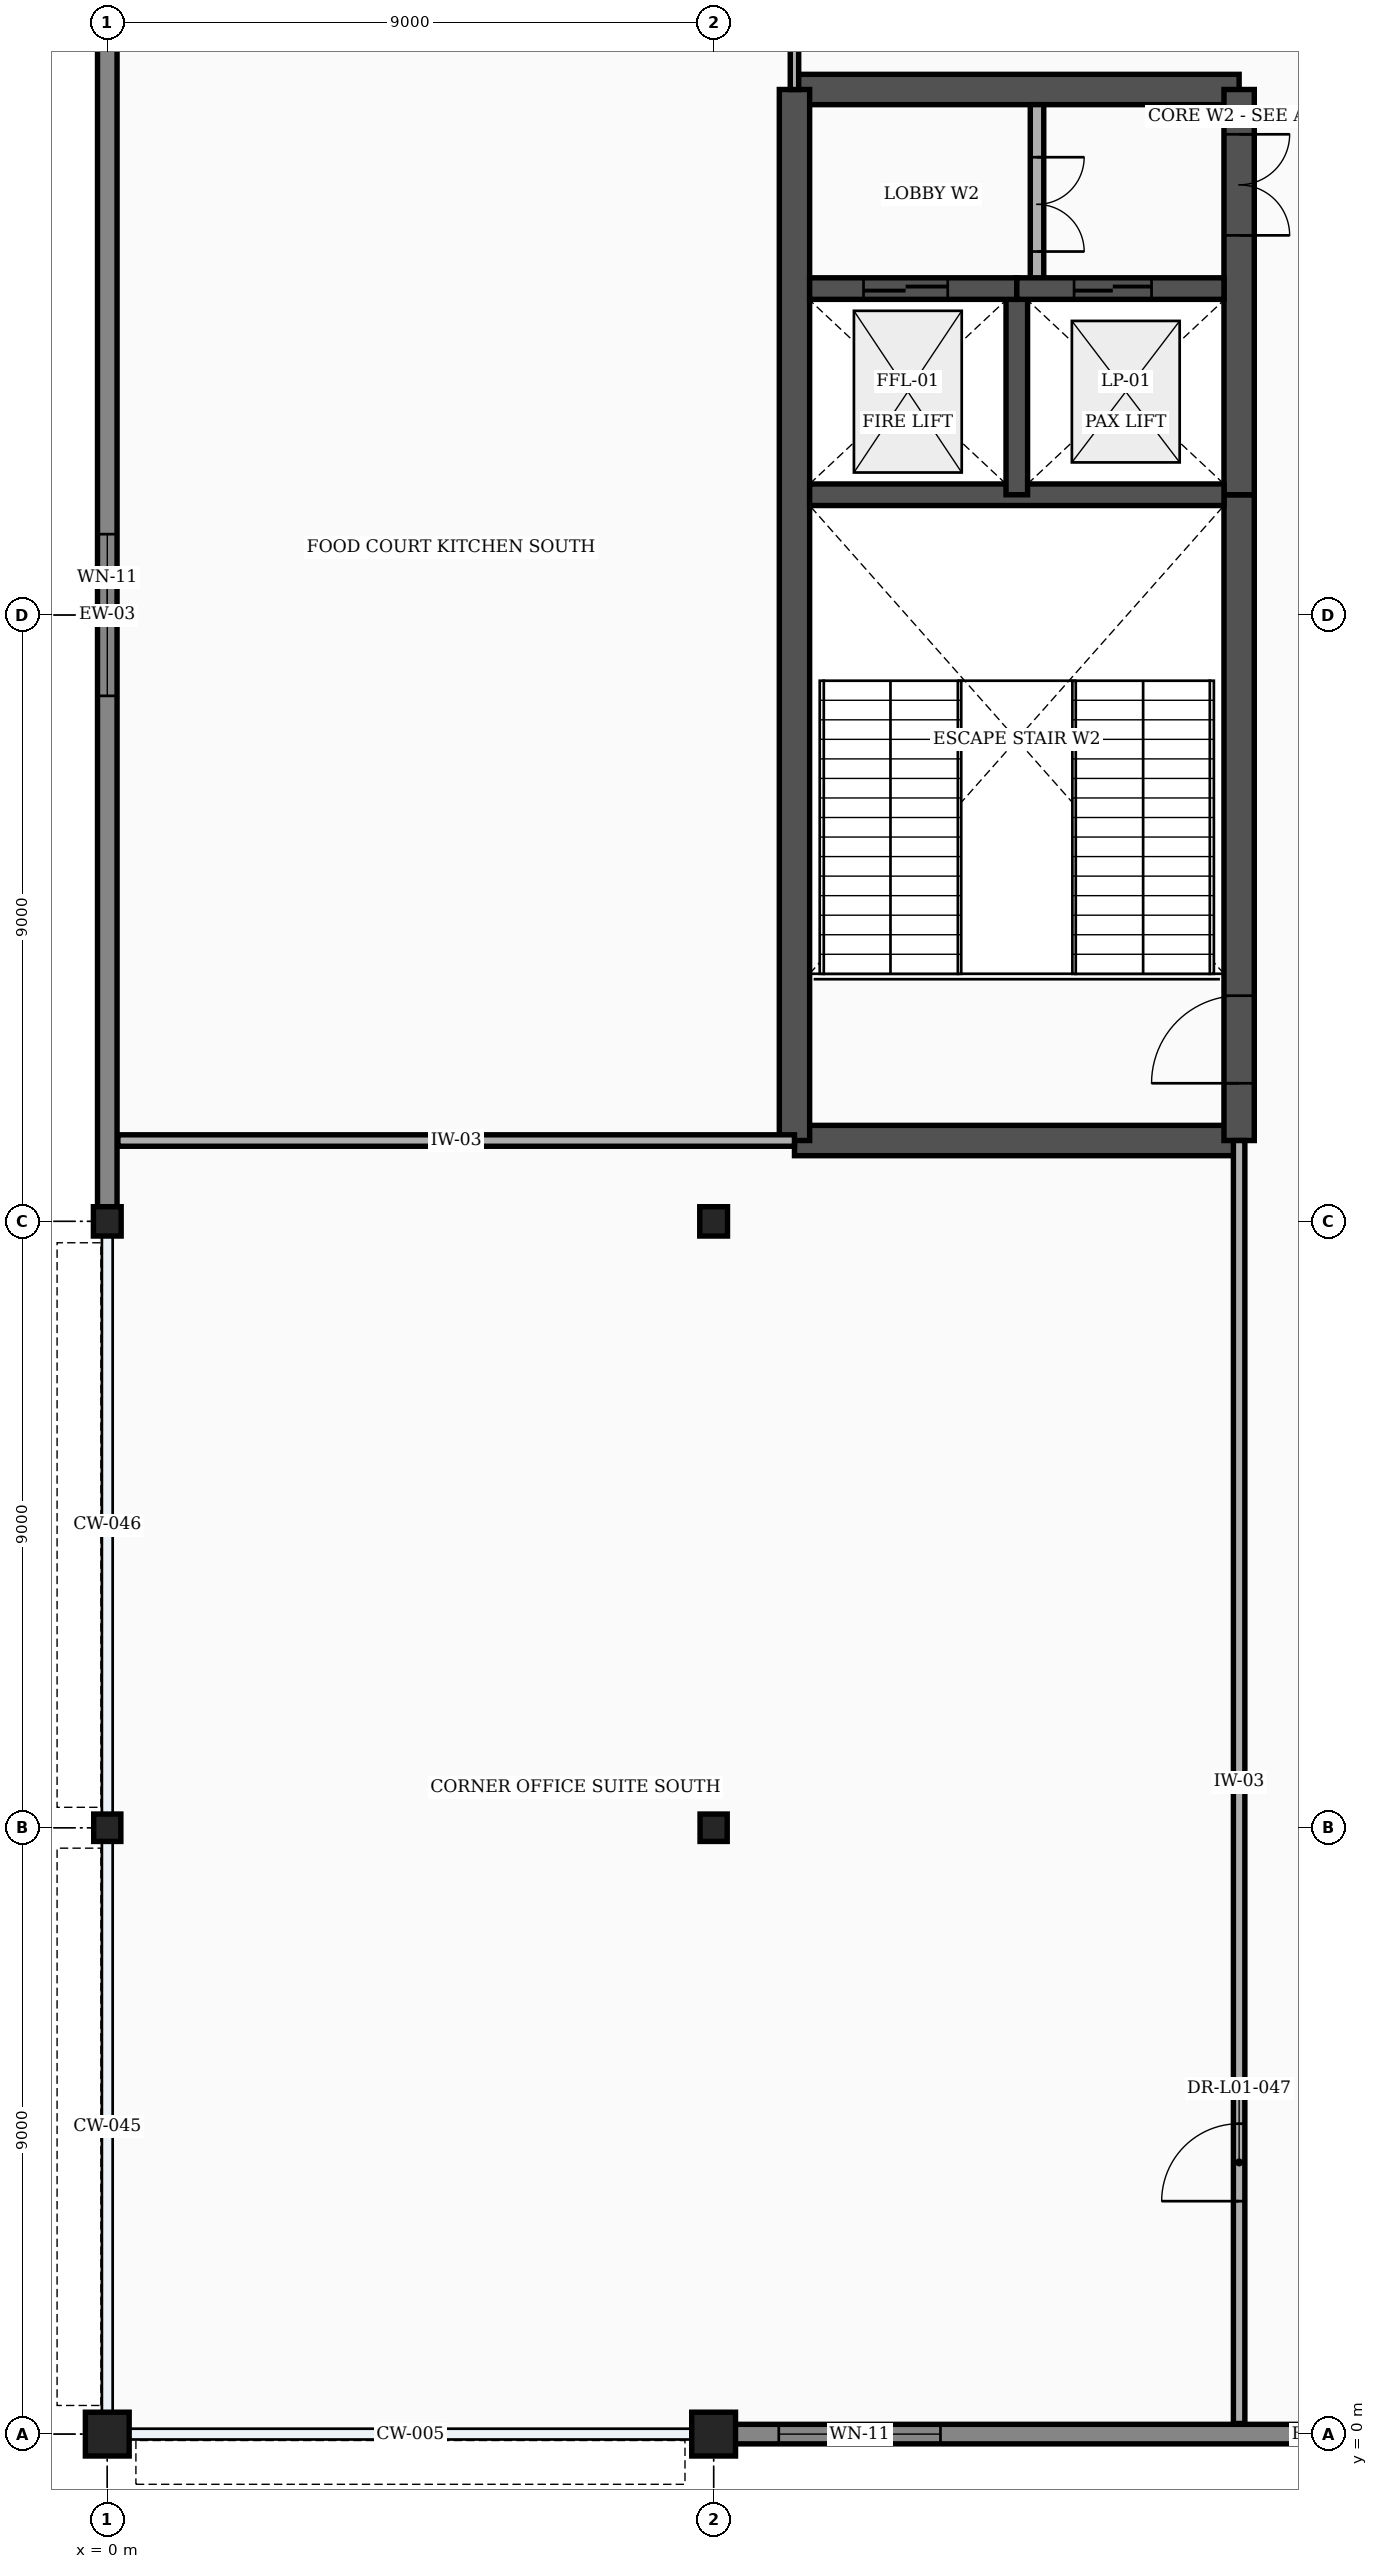
"""IFC4 building model, lengths in metres.
Left out: names, types, materials, properties, quantities, classifications, styles, units other than length and angle.
Written with IfcOpenShell. Run it as: python <this file> out.ifc"""

import sys

from ifc_helpers import new_model, si_unit, direction, frame, frame_2d, origin, origin_with_axes, origin_2d, place, context, subcontext, project, spatial, rectangle, i_section, extrude, element, fill, save


model = new_model("IFC4")
c1 = context("Model", 3, precision=1e-05, world=origin(), true_north=direction((0.0, 1.0)))
c2 = subcontext(c1, "Body", "Model", "MODEL_VIEW")
j1 = project(units=[si_unit("LENGTHUNIT", "METRE"), si_unit("PLANEANGLEUNIT", "RADIAN")], contexts=[c1])
p1 = place(None, origin())
s1 = spatial("IfcSite", under=j1, at=p1, CompositionType="ELEMENT")
p2 = place(p1, origin())
s2 = spatial("IfcBuilding", under=s1, at=p2, CompositionType="ELEMENT")
p3 = place(p2, frame((0.0, 0.0, 6.0)))
s3 = spatial("IfcBuildingStorey", under=s2, at=p3, CompositionType="ELEMENT", Elevation=6.0)
p4 = place(p3, origin_with_axes())
e1 = element("IfcColumn", 1, at=p4, inside=s3, PredefinedType="COLUMN", context=c2, shape_type="SweptSolid", body=[
    extrude(rectangle(XDim=0.65, YDim=0.65, at=origin_2d()), origin(), (0.0, 0.0, 1.0), 5.4),
])
p5 = place(p3, frame((0.0, 9.0, 0.0), z_axis=(0.0, 0.0, 1.0), x_axis=(1.0, 0.0, 0.0)))
e2 = element("IfcColumn", 2, at=p5, inside=s3, PredefinedType="COLUMN", context=c2, shape_type="SweptSolid", body=[
    extrude(i_section(OverallWidth=0.403, OverallDepth=0.406, WebThickness=0.027, FlangeThickness=0.043, at=origin_2d()), origin(), (0.0, 0.0, 1.0), 5.4),
])
p6 = place(p3, frame((0.0, 18.0, 0.0), z_axis=(0.0, 0.0, 1.0), x_axis=(1.0, 0.0, 0.0)))
e3 = element("IfcColumn", 3, at=p6, inside=s3, PredefinedType="COLUMN", context=c2, shape_type="SweptSolid", body=[
    extrude(i_section(OverallWidth=0.412, OverallDepth=0.435, WebThickness=0.036, FlangeThickness=0.058, at=origin_2d()), origin(), (0.0, 0.0, 1.0), 5.4),
])
p7 = place(p3, frame((9.0, 0.0, 0.0), z_axis=(0.0, 0.0, 1.0), x_axis=(1.0, 0.0, 0.0)))
e4 = element("IfcColumn", 4, at=p7, inside=s3, PredefinedType="COLUMN", context=c2, shape_type="SweptSolid", body=[
    extrude(rectangle(XDim=0.65, YDim=0.65, at=origin_2d()), origin(), (0.0, 0.0, 1.0), 5.4),
])
p8 = place(p3, frame((9.0, 9.0, 0.0), z_axis=(0.0, 0.0, 1.0), x_axis=(1.0, 0.0, 0.0)))
e5 = element("IfcColumn", 5, at=p8, inside=s3, PredefinedType="COLUMN", context=c2, shape_type="SweptSolid", body=[
    extrude(i_section(OverallWidth=0.403, OverallDepth=0.406, WebThickness=0.027, FlangeThickness=0.043, at=origin_2d()), origin(), (0.0, 0.0, 1.0), 5.4),
])
p9 = place(p3, frame((9.0, 18.0, 0.0), z_axis=(0.0, 0.0, 1.0), x_axis=(1.0, 0.0, 0.0)))
e6 = element("IfcColumn", 6, at=p9, inside=s3, PredefinedType="COLUMN", context=c2, shape_type="SweptSolid", body=[
    extrude(i_section(OverallWidth=0.412, OverallDepth=0.435, WebThickness=0.036, FlangeThickness=0.058, at=origin_2d()), origin(), (0.0, 0.0, 1.0), 5.4),
])
p10 = place(p3, frame((9.317, 0.0, 0.0), z_axis=(0.0, 0.0, 1.0), x_axis=(1.0, 0.0, 0.0)))
e7 = element("IfcWall", 7, at=p10, inside=s3, PredefinedType="STANDARD", context=c2, shape_type="SweptSolid", body=[
    extrude(rectangle(XDim=17.366, YDim=0.29, at=frame_2d((8.683, 0.0))), origin(), (0.0, 0.0, 1.0), 4.388),
])
p11 = place(p10, frame((0.65, 0.0, 0.85)))
e8 = element("IfcOpeningElement", 8, at=p11, cuts=e7, PredefinedType="OPENING", context=c2, shape_type="SweptSolid", body=[
    extrude(rectangle(XDim=2.4, YDim=2.6, at=frame_2d((1.2, 1.3))), frame((0.0, 0.157, 0.0), z_axis=(0.0, -1.0, 0.0), x_axis=(1.0, 0.0, 0.0)), (0.0, 0.0, 1.0), 0.314),
])
p12 = place(p3, frame((0.0, 18.198, 0.0), z_axis=(0.0, 0.0, 1.0), x_axis=(0.0, 1.0, 0.0)))
e9 = element("IfcWall", 9, at=p12, inside=s3, PredefinedType="STANDARD", context=c2, shape_type="SweptSolid", body=[
    extrude(rectangle(XDim=17.603, YDim=0.29, at=frame_2d((8.802, 0.0))), origin(), (0.0, 0.0, 1.0), 4.467),
])
p13 = place(p12, frame((7.602, 0.0, 0.85)))
e10 = element("IfcOpeningElement", 10, at=p13, cuts=e9, PredefinedType="OPENING", context=c2, shape_type="SweptSolid", body=[
    extrude(rectangle(XDim=2.4, YDim=2.6, at=frame_2d((1.2, 1.3))), frame((0.0, 0.157, 0.0), z_axis=(0.0, -1.0, 0.0), x_axis=(1.0, 0.0, 0.0)), (0.0, 0.0, 1.0), 0.314),
])
for number, where, z_axis, x_axis in (
    (11, (10.2, 19.2, 0.0), (0.0, 0.0, 1.0), (1.0, 0.0, 0.0)),
    (12, (10.2, 34.8, 0.0), (0.0, 0.0, 1.0), (1.0, 0.0, 0.0)),
):
    element("IfcWall", number, at=place(p3, frame(where, z_axis=z_axis, x_axis=x_axis)), inside=s3, PredefinedType="SHEAR", context=c2, shape_type="SweptSolid", body=[
        extrude(rectangle(XDim=6.6, YDim=0.45, at=frame_2d((3.3, 0.0))), origin(), (0.0, 0.0, 1.0), 5.15),
    ])
p14 = place(p3, frame((10.2, 19.2, 0.0), z_axis=(0.0, 0.0, 1.0), x_axis=(0.0, 1.0, 0.0)))
e13 = element("IfcWall", 13, at=p14, inside=s3, PredefinedType="SHEAR", context=c2, shape_type="SweptSolid", body=[
    extrude(rectangle(XDim=15.6, YDim=0.45, at=frame_2d((7.8, 0.0))), origin(), (0.0, 0.0, 1.0), 5.15),
])
p15 = place(p3, frame((16.8, 19.2, 0.0), z_axis=(0.0, 0.0, 1.0), x_axis=(0.0, 1.0, 0.0)))
e14 = element("IfcWall", 14, at=p15, inside=s3, PredefinedType="SHEAR", context=c2, shape_type="SweptSolid", body=[
    extrude(rectangle(XDim=9.585, YDim=0.45, at=frame_2d((4.792, 0.0))), origin(), (0.0, 0.0, 1.0), 5.15),
])
p16 = place(p15, frame((0.85, 0.0, 0.0)))
e15 = element("IfcOpeningElement", 15, at=p16, cuts=e14, PredefinedType="OPENING", context=c2, shape_type="SweptSolid", body=[
    extrude(rectangle(XDim=1.3, YDim=2.2, at=frame_2d((0.65, 1.1))), frame((0.0, 0.237, 0.0), z_axis=(0.0, -1.0, 0.0), x_axis=(1.0, 0.0, 0.0)), (0.0, 0.0, 1.0), 0.474),
])
p17 = place(p3, frame((16.8, 28.785, 0.0), z_axis=(0.0, 0.0, 1.0), x_axis=(0.0, 1.0, 0.0)))
e16 = element("IfcWall", 16, at=p17, inside=s3, PredefinedType="SHEAR", context=c2, shape_type="SweptSolid", body=[
    extrude(rectangle(XDim=6.015, YDim=0.45, at=frame_2d((3.008, 0.0))), origin(), (0.0, 0.0, 1.0), 5.15),
])
p18 = place(p17, frame((3.85, 0.0, 0.0)))
e17 = element("IfcOpeningElement", 17, at=p18, cuts=e16, PredefinedType="OPENING", context=c2, shape_type="SweptSolid", body=[
    extrude(rectangle(XDim=1.5, YDim=2.2, at=frame_2d((0.75, 1.1))), frame((0.0, 0.237, 0.0), z_axis=(0.0, -1.0, 0.0), x_axis=(1.0, 0.0, 0.0)), (0.0, 0.0, 1.0), 0.474),
])
p19 = place(p3, frame((10.425, 28.785, 0.0), z_axis=(0.0, 0.0, 1.0), x_axis=(1.0, 0.0, 0.0)))
e18 = element("IfcWall", 18, at=p19, inside=s3, PredefinedType="SHEAR", context=c2, shape_type="SweptSolid", body=[
    extrude(rectangle(XDim=6.15, YDim=0.32, at=frame_2d((3.075, 0.0))), origin(), (0.0, 0.0, 1.0), 5.15),
])
p20 = place(p3, frame((13.5, 28.785, 0.0), z_axis=(0.0, 0.0, 1.0), x_axis=(0.0, 1.0, 0.0)))
e19 = element("IfcWall", 19, at=p20, inside=s3, PredefinedType="SHEAR", context=c2, shape_type="SweptSolid", body=[
    extrude(rectangle(XDim=3.06, YDim=0.32, at=frame_2d((1.53, 0.0))), origin(), (0.0, 0.0, 1.0), 5.15),
])
p21 = place(p3, frame((13.8, 31.845, 0.0), z_axis=(0.0, 0.0, 1.0), x_axis=(0.0, 1.0, 0.0)))
e20 = element("IfcWall", 20, at=p21, inside=s3, PredefinedType="PARTITIONING", context=c2, shape_type="SweptSolid", body=[
    extrude(rectangle(XDim=2.73, YDim=0.2, at=frame_2d((1.365, 0.0))), origin(), (0.0, 0.0, 1.0), 5.15),
])
p22 = place(p21, frame((0.55, 0.0, 0.0)))
e21 = element("IfcOpeningElement", 21, at=p22, cuts=e20, PredefinedType="OPENING", context=c2, shape_type="SweptSolid", body=[
    extrude(rectangle(XDim=1.4, YDim=2.25, at=frame_2d((0.7, 1.125))), frame((0.0, 0.112, 0.0), z_axis=(0.0, -1.0, 0.0), x_axis=(1.0, 0.0, 0.0)), (0.0, 0.0, 1.0), 0.224),
])
p23 = place(p3, frame((10.425, 31.845, 0.0), z_axis=(0.0, 0.0, 1.0), x_axis=(1.0, 0.0, 0.0)))
e22 = element("IfcWall", 22, at=p23, inside=s3, PredefinedType="SHEAR", context=c2, shape_type="SweptSolid", body=[
    extrude(rectangle(XDim=3.075, YDim=0.32, at=frame_2d((1.538, 0.0))), origin(), (0.0, 0.0, 1.0), 5.15),
])
p24 = place(p23, frame((0.8, 0.0, 0.0)))
e23 = element("IfcOpeningElement", 23, at=p24, cuts=e22, PredefinedType="OPENING", context=c2, shape_type="SweptSolid", body=[
    extrude(rectangle(XDim=1.25, YDim=2.25, at=frame_2d((0.625, 1.125))), frame((0.0, 0.172, 0.0), z_axis=(0.0, -1.0, 0.0), x_axis=(1.0, 0.0, 0.0)), (0.0, 0.0, 1.0), 0.344),
])
p25 = place(p3, frame((13.5, 31.845, 0.0), z_axis=(0.0, 0.0, 1.0), x_axis=(1.0, 0.0, 0.0)))
e24 = element("IfcWall", 24, at=p25, inside=s3, PredefinedType="SHEAR", context=c2, shape_type="SweptSolid", body=[
    extrude(rectangle(XDim=3.075, YDim=0.32, at=frame_2d((1.538, 0.0))), origin(), (0.0, 0.0, 1.0), 5.15),
])
p26 = place(p25, frame((0.85, 0.0, 0.0)))
e25 = element("IfcOpeningElement", 25, at=p26, cuts=e24, PredefinedType="OPENING", context=c2, shape_type="SweptSolid", body=[
    extrude(rectangle(XDim=1.15, YDim=2.2, at=frame_2d((0.575, 1.1))), frame((0.0, 0.172, 0.0), z_axis=(0.0, -1.0, 0.0), x_axis=(1.0, 0.0, 0.0)), (0.0, 0.0, 1.0), 0.344),
])
p27 = place(p3, frame((10.2, 34.8, 0.0), z_axis=(0.0, 0.0, 1.0), x_axis=(0.0, 1.0, 0.0)))
e26 = element("IfcWall", 26, at=p27, inside=s3, PredefinedType="PARTITIONING", context=c2, shape_type="SweptSolid", body=[
    extrude(rectangle(XDim=2.0, YDim=0.125, at=frame_2d((1.0, 0.0))), origin(), (0.0, 0.0, 1.0), 5.15),
])
p28 = place(p3, frame((0.157, 19.2, 0.0), z_axis=(0.0, 0.0, 1.0), x_axis=(1.0, 0.0, 0.0)))
e27 = element("IfcWall", 27, at=p28, inside=s3, PredefinedType="PARTITIONING", context=c2, shape_type="SweptSolid", body=[
    extrude(rectangle(XDim=10.042, YDim=0.17, at=frame_2d((5.021, 0.0))), origin(), (0.0, 0.0, 1.0), 5.15),
])
p29 = place(p3, frame((16.8, 0.157, 0.0), z_axis=(0.0, 0.0, 1.0), x_axis=(0.0, 1.0, 0.0)))
e28 = element("IfcWall", 28, at=p29, inside=s3, PredefinedType="PARTITIONING", context=c2, shape_type="SweptSolid", body=[
    extrude(rectangle(XDim=19.042, YDim=0.17, at=frame_2d((9.521, 0.0))), origin(), (0.0, 0.0, 1.0), 5.15),
])
p30 = place(p29, frame((3.3, 0.0, 0.0)))
e29 = element("IfcOpeningElement", 29, at=p30, cuts=e28, PredefinedType="OPENING", context=c2, shape_type="SweptSolid", body=[
    extrude(rectangle(XDim=1.15, YDim=2.15, at=frame_2d((0.575, 1.075))), frame((0.0, 0.097, 0.0), z_axis=(0.0, -1.0, 0.0), x_axis=(1.0, 0.0, 0.0)), (0.0, 0.0, 1.0), 0.194),
])
p31 = place(p11, origin())
e30 = element("IfcWindow", 30, at=p31, inside=s3, PartitioningType="SINGLE_PANEL", PredefinedType="WINDOW", context=c2, shape_type="SweptSolid", body=[
    extrude(rectangle(XDim=2.4, YDim=2.6, at=frame_2d((1.2, 1.3))), frame((0.0, 0.03, 0.0), z_axis=(0.0, -1.0, 0.0), x_axis=(1.0, 0.0, 0.0)), (0.0, 0.0, 1.0), 0.06),
])
fill(e8, e30)
p32 = place(p13, origin())
e31 = element("IfcWindow", 31, at=p32, inside=s3, PartitioningType="SINGLE_PANEL", PredefinedType="WINDOW", context=c2, shape_type="SweptSolid", body=[
    extrude(rectangle(XDim=2.4, YDim=2.6, at=frame_2d((1.2, 1.3))), frame((0.0, 0.03, 0.0), z_axis=(0.0, -1.0, 0.0), x_axis=(1.0, 0.0, 0.0)), (0.0, 0.0, 1.0), 0.06),
])
fill(e10, e31)
p33 = place(p16, origin())
e32 = element("IfcDoor", 32, at=p33, inside=s3, OperationType="SINGLE_SWING_LEFT", PredefinedType="DOOR", context=c2, shape_type="SweptSolid", body=[
    extrude(rectangle(XDim=1.3, YDim=2.2, at=frame_2d((0.65, 1.1))), frame((0.0, 0.025, 0.0), z_axis=(0.0, -1.0, 0.0), x_axis=(1.0, 0.0, 0.0)), (0.0, 0.0, 1.0), 0.05),
])
fill(e15, e32)
p34 = place(p18, frame((1.5, 0.0, 0.0), z_axis=(0.0, 0.0, 1.0), x_axis=(-1.0, 0.0, 0.0)))
e33 = element("IfcDoor", 33, at=p34, inside=s3, OperationType="DOUBLE_DOOR_SINGLE_SWING", PredefinedType="DOOR", context=c2, shape_type="SweptSolid", body=[
    extrude(rectangle(XDim=1.5, YDim=2.2, at=frame_2d((0.75, 1.1))), frame((0.0, 0.025, 0.0), z_axis=(0.0, -1.0, 0.0), x_axis=(1.0, 0.0, 0.0)), (0.0, 0.0, 1.0), 0.05),
])
fill(e17, e33)
p35 = place(p22, frame((1.4, 0.0, 0.0), z_axis=(0.0, 0.0, 1.0), x_axis=(-1.0, 0.0, 0.0)))
e34 = element("IfcDoor", 34, at=p35, inside=s3, OperationType="DOUBLE_DOOR_SINGLE_SWING", PredefinedType="DOOR", context=c2, shape_type="SweptSolid", body=[
    extrude(rectangle(XDim=1.4, YDim=2.25, at=frame_2d((0.7, 1.125))), frame((0.0, 0.025, 0.0), z_axis=(0.0, -1.0, 0.0), x_axis=(1.0, 0.0, 0.0)), (0.0, 0.0, 1.0), 0.05),
])
fill(e21, e34)
p36 = place(p24, origin())
e35 = element("IfcDoor", 35, at=p36, inside=s3, OperationType="DOUBLE_DOOR_SLIDING", PredefinedType="DOOR", context=c2, shape_type="SweptSolid", body=[
    extrude(rectangle(XDim=1.25, YDim=2.25, at=frame_2d((0.625, 1.125))), frame((0.0, 0.025, 0.0), z_axis=(0.0, -1.0, 0.0), x_axis=(1.0, 0.0, 0.0)), (0.0, 0.0, 1.0), 0.05),
])
fill(e23, e35)
p37 = place(p26, origin())
e36 = element("IfcDoor", 36, at=p37, inside=s3, OperationType="DOUBLE_DOOR_SLIDING", PredefinedType="DOOR", context=c2, shape_type="SweptSolid", body=[
    extrude(rectangle(XDim=1.15, YDim=2.2, at=frame_2d((0.575, 1.1))), frame((0.0, 0.025, 0.0), z_axis=(0.0, -1.0, 0.0), x_axis=(1.0, 0.0, 0.0)), (0.0, 0.0, 1.0), 0.05),
])
fill(e25, e36)
p38 = place(p30, origin())
e37 = element("IfcDoor", 37, at=p38, inside=s3, OperationType="SINGLE_SWING_LEFT", PredefinedType="DOOR", context=c2, shape_type="SweptSolid", body=[
    extrude(rectangle(XDim=1.15, YDim=2.15, at=frame_2d((0.575, 1.075))), frame((0.0, 0.025, 0.0), z_axis=(0.0, -1.0, 0.0), x_axis=(1.0, 0.0, 0.0)), (0.0, 0.0, 1.0), 0.05),
])
fill(e29, e37)
save(model, sys.argv[1])
